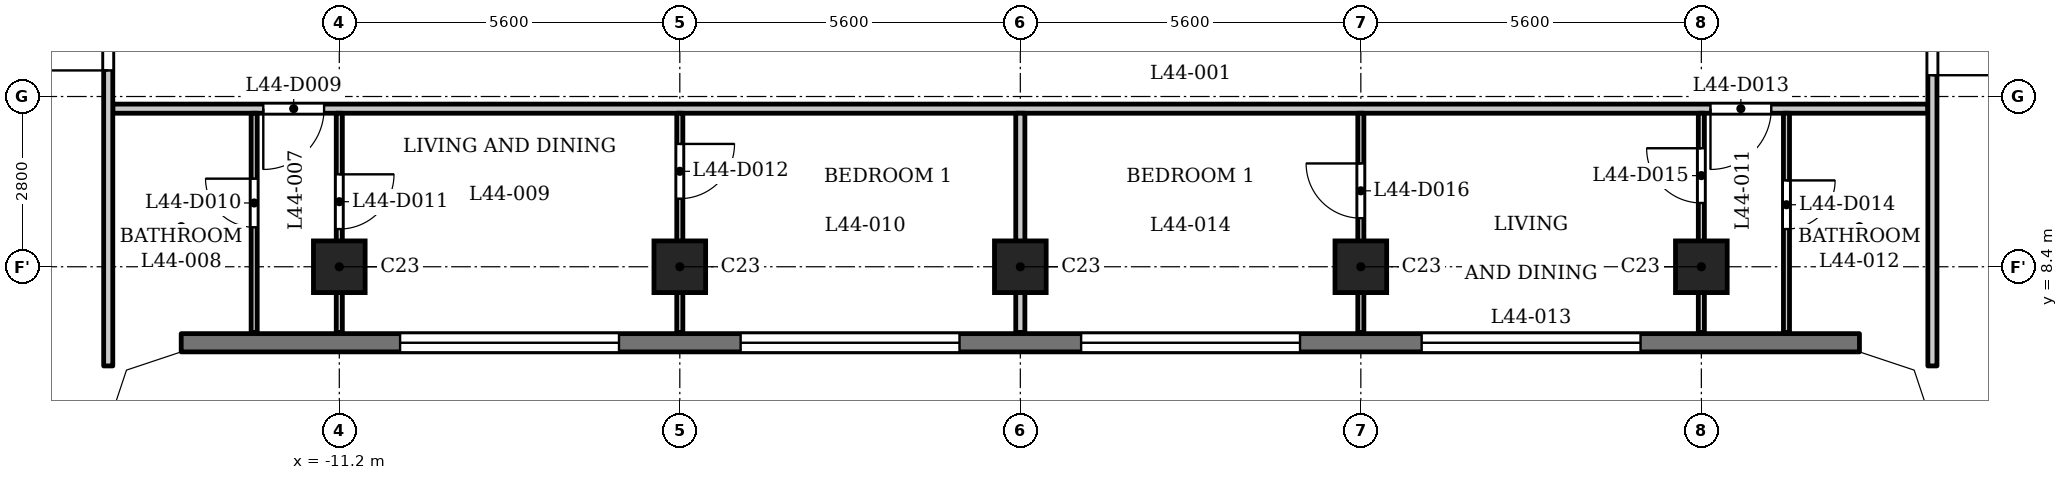
"""IFC4 building model, lengths in metres.
Left out: names, types, materials, properties, quantities, classifications, styles, units other than length and angle.
Written with IfcOpenShell. Run it as: python <this file> out.ifc"""

import sys

from ifc_helpers import new_model, si_unit, direction, frame, frame_2d, origin, origin_2d, place, context, subcontext, project, spatial, polyline, rectangle, outline, extrude, element, fill, save


model = new_model("IFC4")
c1 = context("Model", 3, precision=1e-05, world=origin(), true_north=direction((0.0, 1.0)))
c2 = subcontext(c1, "Body", "Model", "MODEL_VIEW")
j1 = project(units=[si_unit("LENGTHUNIT", "METRE"), si_unit("PLANEANGLEUNIT", "RADIAN")], contexts=[c1])
p1 = place(None, origin())
s1 = spatial("IfcSite", under=j1, at=p1, CompositionType="ELEMENT")
p2 = place(p1, origin())
s2 = spatial("IfcBuilding", under=s1, at=p2, CompositionType="ELEMENT")
p3 = place(p2, frame((0.0, 0.0, 171.1)))
s3 = spatial("IfcBuildingStorey", under=s2, at=p3, CompositionType="ELEMENT", Elevation=171.1)
for number, where, z_axis, x_axis in (
    (1, (-11.2, 8.4, 0.0), (0.0, 0.0, 1.0), (1.0, 0.0, 0.0)),
    (2, (-5.6, 8.4, 0.0), (0.0, 0.0, 1.0), (1.0, 0.0, 0.0)),
    (3, (0.0, 8.4, 0.0), (0.0, 0.0, 1.0), (1.0, 0.0, 0.0)),
    (4, (5.6, 8.4, 0.0), (0.0, 0.0, 1.0), (1.0, 0.0, 0.0)),
    (5, (11.2, 8.4, 0.0), (0.0, 0.0, 1.0), (1.0, 0.0, 0.0)),
):
    element("IfcColumn", number, at=place(p3, frame(where, z_axis=z_axis, x_axis=x_axis)), inside=s3, PredefinedType="COLUMN", context=c2, shape_type="SweptSolid", body=[
        extrude(rectangle(XDim=0.85, YDim=0.85, at=origin_2d()), origin(), (0.0, 0.0, 1.0), 3.5),
    ])
p4 = place(p3, frame((-13.8, 7.15, 0.0), z_axis=(0.0, 0.0, 1.0), x_axis=(1.0, 0.0, 0.0)))
e6 = element("IfcWall", 6, at=p4, inside=s3, PredefinedType="SOLIDWALL", context=c2, shape_type="SweptSolid", body=[
    extrude(rectangle(XDim=27.6, YDim=0.3, at=frame_2d((13.8, 0.0))), origin(), (0.0, 0.0, 1.0), 3.2),
])
p5 = place(p4, frame((3.6, 0.0, 1.2)))
e7 = element("IfcOpeningElement", 7, at=p5, cuts=e6, PredefinedType="OPENING", context=c2, shape_type="SweptSolid", body=[
    extrude(rectangle(XDim=3.6, YDim=0.95, at=frame_2d((1.8, 0.475))), frame((0.0, 0.16, 0.0), z_axis=(0.0, -1.0, 0.0), x_axis=(1.0, 0.0, 0.0)), (0.0, 0.0, 1.0), 0.32),
])
p6 = place(p4, frame((9.2, 0.0, 1.2)))
e8 = element("IfcOpeningElement", 8, at=p6, cuts=e6, PredefinedType="OPENING", context=c2, shape_type="SweptSolid", body=[
    extrude(rectangle(XDim=3.6, YDim=0.95, at=frame_2d((1.8, 0.475))), frame((0.0, 0.16, 0.0), z_axis=(0.0, -1.0, 0.0), x_axis=(1.0, 0.0, 0.0)), (0.0, 0.0, 1.0), 0.32),
])
p7 = place(p4, frame((14.8, 0.0, 1.2)))
e9 = element("IfcOpeningElement", 9, at=p7, cuts=e6, PredefinedType="OPENING", context=c2, shape_type="SweptSolid", body=[
    extrude(rectangle(XDim=3.6, YDim=0.95, at=frame_2d((1.8, 0.475))), frame((0.0, 0.16, 0.0), z_axis=(0.0, -1.0, 0.0), x_axis=(1.0, 0.0, 0.0)), (0.0, 0.0, 1.0), 0.32),
])
p8 = place(p4, frame((20.4, 0.0, 1.2)))
e10 = element("IfcOpeningElement", 10, at=p8, cuts=e6, PredefinedType="OPENING", context=c2, shape_type="SweptSolid", body=[
    extrude(rectangle(XDim=3.6, YDim=0.95, at=frame_2d((1.8, 0.475))), frame((0.0, 0.16, 0.0), z_axis=(0.0, -1.0, 0.0), x_axis=(1.0, 0.0, 0.0)), (0.0, 0.0, 1.0), 0.32),
])
p9 = place(p3, frame((-14.925, 11.0, 0.0), z_axis=(0.0, 0.0, 1.0), x_axis=(1.0, 0.0, 0.0)))
e11 = element("IfcWall", 11, at=p9, inside=s3, PredefinedType="PARTITIONING", context=c2, shape_type="SweptSolid", body=[
    extrude(rectangle(XDim=29.85, YDim=0.15, at=frame_2d((14.925, 0.0))), origin(), (0.0, 0.0, 1.0), 3.2),
])
p10 = place(p9, frame((2.475, 0.0, 0.0)))
e12 = element("IfcOpeningElement", 12, at=p10, cuts=e11, PredefinedType="OPENING", context=c2, shape_type="SweptSolid", body=[
    extrude(rectangle(XDim=1.0, YDim=2.1, at=frame_2d((0.5, 1.05))), frame((0.0, 0.085, 0.0), z_axis=(0.0, -1.0, 0.0), x_axis=(1.0, 0.0, 0.0)), (0.0, 0.0, 1.0), 0.17),
])
p11 = place(p9, frame((26.275, 0.0, 0.0)))
e13 = element("IfcOpeningElement", 13, at=p11, cuts=e11, PredefinedType="OPENING", context=c2, shape_type="SweptSolid", body=[
    extrude(rectangle(XDim=1.0, YDim=2.1, at=frame_2d((0.5, 1.05))), frame((0.0, 0.085, 0.0), z_axis=(0.0, -1.0, 0.0), x_axis=(1.0, 0.0, 0.0)), (0.0, 0.0, 1.0), 0.17),
])
p12 = place(p3, frame((-15.0, 6.769, 0.0), z_axis=(0.0, 0.0, 1.0), x_axis=(0.0, 1.0, 0.0)))
e14 = element("IfcWall", 14, at=p12, inside=s3, PredefinedType="PARTITIONING", context=c2, shape_type="SweptSolid", body=[
    extrude(rectangle(XDim=6.356, YDim=0.15, at=frame_2d((3.178, 0.0))), origin(), (0.0, 0.0, 1.0), 3.2),
])
p13 = place(p12, frame((4.86, 0.0, 0.0)))
e15 = element("IfcOpeningElement", 15, at=p13, cuts=e14, PredefinedType="OPENING", context=c2, shape_type="SweptSolid", body=[
    extrude(rectangle(XDim=1.0, YDim=2.1, at=frame_2d((0.5, 1.05))), frame((0.0, 0.085, 0.0), z_axis=(0.0, -1.0, 0.0), x_axis=(1.0, 0.0, 0.0)), (0.0, 0.0, 1.0), 0.17),
])
p14 = place(p3, frame((-12.6, 7.32, 0.0), z_axis=(0.0, 0.0, 1.0), x_axis=(0.0, 1.0, 0.0)))
e16 = element("IfcWall", 16, at=p14, inside=s3, PredefinedType="PARTITIONING", context=c2, shape_type="SweptSolid", body=[
    extrude(rectangle(XDim=3.605, YDim=0.1, at=frame_2d((1.802, 0.0))), origin(), (0.0, 0.0, 1.0), 3.2),
])
p15 = place(p14, frame((1.729, 0.0, 0.0)))
e17 = element("IfcOpeningElement", 17, at=p15, cuts=e16, PredefinedType="OPENING", context=c2, shape_type="SweptSolid", body=[
    extrude(rectangle(XDim=0.8, YDim=2.1, at=frame_2d((0.4, 1.05))), frame((0.0, 0.06, 0.0), z_axis=(0.0, -1.0, 0.0), x_axis=(1.0, 0.0, 0.0)), (0.0, 0.0, 1.0), 0.12),
])
p16 = place(p3, frame((-11.2, 7.32, 0.0), z_axis=(0.0, 0.0, 1.0), x_axis=(0.0, 1.0, 0.0)))
e18 = element("IfcWall", 18, at=p16, inside=s3, PredefinedType="PARTITIONING", context=c2, shape_type="SweptSolid", body=[
    extrude(rectangle(XDim=3.605, YDim=0.1, at=frame_2d((1.802, 0.0))), origin(), (0.0, 0.0, 1.0), 3.2),
])
p17 = place(p16, frame((1.7, 0.0, 0.0)))
e19 = element("IfcOpeningElement", 19, at=p17, cuts=e18, PredefinedType="OPENING", context=c2, shape_type="SweptSolid", body=[
    extrude(rectangle(XDim=0.9, YDim=2.1, at=frame_2d((0.45, 1.05))), frame((0.0, 0.06, 0.0), z_axis=(0.0, -1.0, 0.0), x_axis=(1.0, 0.0, 0.0)), (0.0, 0.0, 1.0), 0.12),
])
p18 = place(p3, frame((-5.6, 7.32, 0.0), z_axis=(0.0, 0.0, 1.0), x_axis=(0.0, 1.0, 0.0)))
e20 = element("IfcWall", 20, at=p18, inside=s3, PredefinedType="PARTITIONING", context=c2, shape_type="SweptSolid", body=[
    extrude(rectangle(XDim=3.605, YDim=0.1, at=frame_2d((1.802, 0.0))), origin(), (0.0, 0.0, 1.0), 3.2),
])
p19 = place(p18, frame((2.2, 0.0, 0.0)))
e21 = element("IfcOpeningElement", 21, at=p19, cuts=e20, PredefinedType="OPENING", context=c2, shape_type="SweptSolid", body=[
    extrude(rectangle(XDim=0.9, YDim=2.1, at=frame_2d((0.45, 1.05))), frame((0.0, 0.06, 0.0), z_axis=(0.0, -1.0, 0.0), x_axis=(1.0, 0.0, 0.0)), (0.0, 0.0, 1.0), 0.12),
])
p20 = place(p3, frame((0.0, 7.32, 0.0), z_axis=(0.0, 0.0, 1.0), x_axis=(0.0, 1.0, 0.0)))
e22 = element("IfcWall", 22, at=p20, inside=s3, PredefinedType="PARTITIONING", context=c2, shape_type="SweptSolid", body=[
    extrude(rectangle(XDim=3.605, YDim=0.15, at=frame_2d((1.802, 0.0))), origin(), (0.0, 0.0, 1.0), 3.2),
])
p21 = place(p3, frame((5.6, 7.32, 0.0), z_axis=(0.0, 0.0, 1.0), x_axis=(0.0, 1.0, 0.0)))
e23 = element("IfcWall", 23, at=p21, inside=s3, PredefinedType="PARTITIONING", context=c2, shape_type="SweptSolid", body=[
    extrude(rectangle(XDim=3.605, YDim=0.1, at=frame_2d((1.802, 0.0))), origin(), (0.0, 0.0, 1.0), 3.2),
])
p22 = place(p21, frame((1.879, 0.0, 0.0)))
e24 = element("IfcOpeningElement", 24, at=p22, cuts=e23, PredefinedType="OPENING", context=c2, shape_type="SweptSolid", body=[
    extrude(rectangle(XDim=0.9, YDim=2.1, at=frame_2d((0.45, 1.05))), frame((0.0, 0.06, 0.0), z_axis=(0.0, -1.0, 0.0), x_axis=(1.0, 0.0, 0.0)), (0.0, 0.0, 1.0), 0.12),
])
p23 = place(p3, frame((11.2, 7.32, 0.0), z_axis=(0.0, 0.0, 1.0), x_axis=(0.0, 1.0, 0.0)))
e25 = element("IfcWall", 25, at=p23, inside=s3, PredefinedType="PARTITIONING", context=c2, shape_type="SweptSolid", body=[
    extrude(rectangle(XDim=3.605, YDim=0.1, at=frame_2d((1.802, 0.0))), origin(), (0.0, 0.0, 1.0), 3.2),
])
p24 = place(p23, frame((2.129, 0.0, 0.0)))
e26 = element("IfcOpeningElement", 26, at=p24, cuts=e25, PredefinedType="OPENING", context=c2, shape_type="SweptSolid", body=[
    extrude(rectangle(XDim=0.9, YDim=2.1, at=frame_2d((0.45, 1.05))), frame((0.0, 0.06, 0.0), z_axis=(0.0, -1.0, 0.0), x_axis=(1.0, 0.0, 0.0)), (0.0, 0.0, 1.0), 0.12),
])
p25 = place(p3, frame((12.6, 7.32, 0.0), z_axis=(0.0, 0.0, 1.0), x_axis=(0.0, 1.0, 0.0)))
e27 = element("IfcWall", 27, at=p25, inside=s3, PredefinedType="PARTITIONING", context=c2, shape_type="SweptSolid", body=[
    extrude(rectangle(XDim=3.605, YDim=0.1, at=frame_2d((1.802, 0.0))), origin(), (0.0, 0.0, 1.0), 3.2),
])
p26 = place(p25, frame((1.7, 0.0, 0.0)))
e28 = element("IfcOpeningElement", 28, at=p26, cuts=e27, PredefinedType="OPENING", context=c2, shape_type="SweptSolid", body=[
    extrude(rectangle(XDim=0.8, YDim=2.1, at=frame_2d((0.4, 1.05))), frame((0.0, 0.06, 0.0), z_axis=(0.0, -1.0, 0.0), x_axis=(1.0, 0.0, 0.0)), (0.0, 0.0, 1.0), 0.12),
])
p27 = place(p3, frame((15.0, 6.769, 0.0), z_axis=(0.0, 0.0, 1.0), x_axis=(0.0, 1.0, 0.0)))
e29 = element("IfcWall", 29, at=p27, inside=s3, PredefinedType="PARTITIONING", context=c2, shape_type="SweptSolid", body=[
    extrude(rectangle(XDim=6.356, YDim=0.15, at=frame_2d((3.178, 0.0))), origin(), (0.0, 0.0, 1.0), 3.2),
])
p28 = place(p27, frame((4.781, 0.0, 0.0)))
e30 = element("IfcOpeningElement", 30, at=p28, cuts=e29, PredefinedType="OPENING", context=c2, shape_type="SweptSolid", body=[
    extrude(rectangle(XDim=1.0, YDim=2.1, at=frame_2d((0.5, 1.05))), frame((0.0, 0.085, 0.0), z_axis=(0.0, -1.0, 0.0), x_axis=(1.0, 0.0, 0.0)), (0.0, 0.0, 1.0), 0.17),
])
p29 = place(p3, origin())
e31 = element("IfcWall", 31, at=p29, inside=s3, PredefinedType="SOLIDWALL", context=c2, shape_type="SweptSolid", body=[
    extrude(outline(polyline([(-13.849, 7.3), (-14.937, 6.937), (-15.3, 5.849), (-15.3, 5.8), (-15.0, 5.8), (-14.7, 6.7), (-13.8, 7.0), (-13.8, 7.3), (-13.849, 7.3)])), origin(), (0.0, 0.0, 1.0), 3.2),
])
e32 = element("IfcWall", 32, at=p29, inside=s3, PredefinedType="SOLIDWALL", context=c2, shape_type="SweptSolid", body=[
    extrude(outline(polyline([(14.937, 6.937), (13.849, 7.3), (13.8, 7.3), (13.8, 7.0), (14.7, 6.7), (15.0, 5.8), (15.3, 5.8), (15.3, 5.849), (14.937, 6.937)])), origin(), (0.0, 0.0, 1.0), 3.2),
])
p30 = place(p13, origin())
e33 = element("IfcDoor", 33, at=p30, inside=s3, OperationType="SINGLE_SWING_RIGHT", PredefinedType="DOOR", context=c2, shape_type="SweptSolid", body=[
    extrude(rectangle(XDim=1.0, YDim=2.1, at=frame_2d((0.5, 1.05))), frame((0.0, 0.025, 0.0), z_axis=(0.0, -1.0, 0.0), x_axis=(1.0, 0.0, 0.0)), (0.0, 0.0, 1.0), 0.05),
])
fill(e15, e33)
p31 = place(p28, origin())
e34 = element("IfcDoor", 34, at=p31, inside=s3, OperationType="SINGLE_SWING_LEFT", PredefinedType="DOOR", context=c2, shape_type="SweptSolid", body=[
    extrude(rectangle(XDim=1.0, YDim=2.1, at=frame_2d((0.5, 1.05))), frame((0.0, 0.025, 0.0), z_axis=(0.0, -1.0, 0.0), x_axis=(1.0, 0.0, 0.0)), (0.0, 0.0, 1.0), 0.05),
])
fill(e30, e34)
p32 = place(p10, origin())
e35 = element("IfcDoor", 35, at=p32, inside=s3, OperationType="SINGLE_SWING_LEFT", PredefinedType="DOOR", context=c2, shape_type="SweptSolid", body=[
    extrude(rectangle(XDim=1.0, YDim=2.1, at=frame_2d((0.5, 1.05))), frame((0.0, 0.025, 0.0), z_axis=(0.0, -1.0, 0.0), x_axis=(1.0, 0.0, 0.0)), (0.0, 0.0, 1.0), 0.05),
])
fill(e12, e35)
p33 = place(p15, origin())
e36 = element("IfcDoor", 36, at=p33, inside=s3, OperationType="SINGLE_SWING_LEFT", PredefinedType="DOOR", context=c2, shape_type="SweptSolid", body=[
    extrude(rectangle(XDim=0.8, YDim=2.1, at=frame_2d((0.4, 1.05))), frame((0.0, 0.025, 0.0), z_axis=(0.0, -1.0, 0.0), x_axis=(1.0, 0.0, 0.0)), (0.0, 0.0, 1.0), 0.05),
])
fill(e17, e36)
p34 = place(p17, origin())
e37 = element("IfcDoor", 37, at=p34, inside=s3, OperationType="SINGLE_SWING_RIGHT", PredefinedType="DOOR", context=c2, shape_type="SweptSolid", body=[
    extrude(rectangle(XDim=0.9, YDim=2.1, at=frame_2d((0.45, 1.05))), frame((0.0, 0.025, 0.0), z_axis=(0.0, -1.0, 0.0), x_axis=(1.0, 0.0, 0.0)), (0.0, 0.0, 1.0), 0.05),
])
fill(e19, e37)
p35 = place(p19, origin())
e38 = element("IfcDoor", 38, at=p35, inside=s3, OperationType="SINGLE_SWING_RIGHT", PredefinedType="DOOR", context=c2, shape_type="SweptSolid", body=[
    extrude(rectangle(XDim=0.9, YDim=2.1, at=frame_2d((0.45, 1.05))), frame((0.0, 0.025, 0.0), z_axis=(0.0, -1.0, 0.0), x_axis=(1.0, 0.0, 0.0)), (0.0, 0.0, 1.0), 0.05),
])
fill(e21, e38)
p36 = place(p11, origin())
e39 = element("IfcDoor", 39, at=p36, inside=s3, OperationType="SINGLE_SWING_LEFT", PredefinedType="DOOR", context=c2, shape_type="SweptSolid", body=[
    extrude(rectangle(XDim=1.0, YDim=2.1, at=frame_2d((0.5, 1.05))), frame((0.0, 0.025, 0.0), z_axis=(0.0, -1.0, 0.0), x_axis=(1.0, 0.0, 0.0)), (0.0, 0.0, 1.0), 0.05),
])
fill(e13, e39)
p37 = place(p26, origin())
e40 = element("IfcDoor", 40, at=p37, inside=s3, OperationType="SINGLE_SWING_RIGHT", PredefinedType="DOOR", context=c2, shape_type="SweptSolid", body=[
    extrude(rectangle(XDim=0.8, YDim=2.1, at=frame_2d((0.4, 1.05))), frame((0.0, 0.025, 0.0), z_axis=(0.0, -1.0, 0.0), x_axis=(1.0, 0.0, 0.0)), (0.0, 0.0, 1.0), 0.05),
])
fill(e28, e40)
p38 = place(p24, origin())
e41 = element("IfcDoor", 41, at=p38, inside=s3, OperationType="SINGLE_SWING_LEFT", PredefinedType="DOOR", context=c2, shape_type="SweptSolid", body=[
    extrude(rectangle(XDim=0.9, YDim=2.1, at=frame_2d((0.45, 1.05))), frame((0.0, 0.025, 0.0), z_axis=(0.0, -1.0, 0.0), x_axis=(1.0, 0.0, 0.0)), (0.0, 0.0, 1.0), 0.05),
])
fill(e26, e41)
p39 = place(p22, origin())
e42 = element("IfcDoor", 42, at=p39, inside=s3, OperationType="SINGLE_SWING_LEFT", PredefinedType="DOOR", context=c2, shape_type="SweptSolid", body=[
    extrude(rectangle(XDim=0.9, YDim=2.1, at=frame_2d((0.45, 1.05))), frame((0.0, 0.025, 0.0), z_axis=(0.0, -1.0, 0.0), x_axis=(1.0, 0.0, 0.0)), (0.0, 0.0, 1.0), 0.05),
])
fill(e24, e42)
p40 = place(p5, origin())
e43 = element("IfcWindow", 43, at=p40, inside=s3, PartitioningType="SINGLE_PANEL", PredefinedType="WINDOW", context=c2, shape_type="SweptSolid", body=[
    extrude(rectangle(XDim=3.6, YDim=0.95, at=frame_2d((1.8, 0.475))), frame((0.0, 0.03, 0.0), z_axis=(0.0, -1.0, 0.0), x_axis=(1.0, 0.0, 0.0)), (0.0, 0.0, 1.0), 0.06),
])
fill(e7, e43)
p41 = place(p6, origin())
e44 = element("IfcWindow", 44, at=p41, inside=s3, PartitioningType="SINGLE_PANEL", PredefinedType="WINDOW", context=c2, shape_type="SweptSolid", body=[
    extrude(rectangle(XDim=3.6, YDim=0.95, at=frame_2d((1.8, 0.475))), frame((0.0, 0.03, 0.0), z_axis=(0.0, -1.0, 0.0), x_axis=(1.0, 0.0, 0.0)), (0.0, 0.0, 1.0), 0.06),
])
fill(e8, e44)
p42 = place(p7, origin())
e45 = element("IfcWindow", 45, at=p42, inside=s3, PartitioningType="SINGLE_PANEL", PredefinedType="WINDOW", context=c2, shape_type="SweptSolid", body=[
    extrude(rectangle(XDim=3.6, YDim=0.95, at=frame_2d((1.8, 0.475))), frame((0.0, 0.03, 0.0), z_axis=(0.0, -1.0, 0.0), x_axis=(1.0, 0.0, 0.0)), (0.0, 0.0, 1.0), 0.06),
])
fill(e9, e45)
p43 = place(p8, origin())
e46 = element("IfcWindow", 46, at=p43, inside=s3, PartitioningType="SINGLE_PANEL", PredefinedType="WINDOW", context=c2, shape_type="SweptSolid", body=[
    extrude(rectangle(XDim=3.6, YDim=0.95, at=frame_2d((1.8, 0.475))), frame((0.0, 0.03, 0.0), z_axis=(0.0, -1.0, 0.0), x_axis=(1.0, 0.0, 0.0)), (0.0, 0.0, 1.0), 0.06),
])
fill(e10, e46)
save(model, sys.argv[1])
